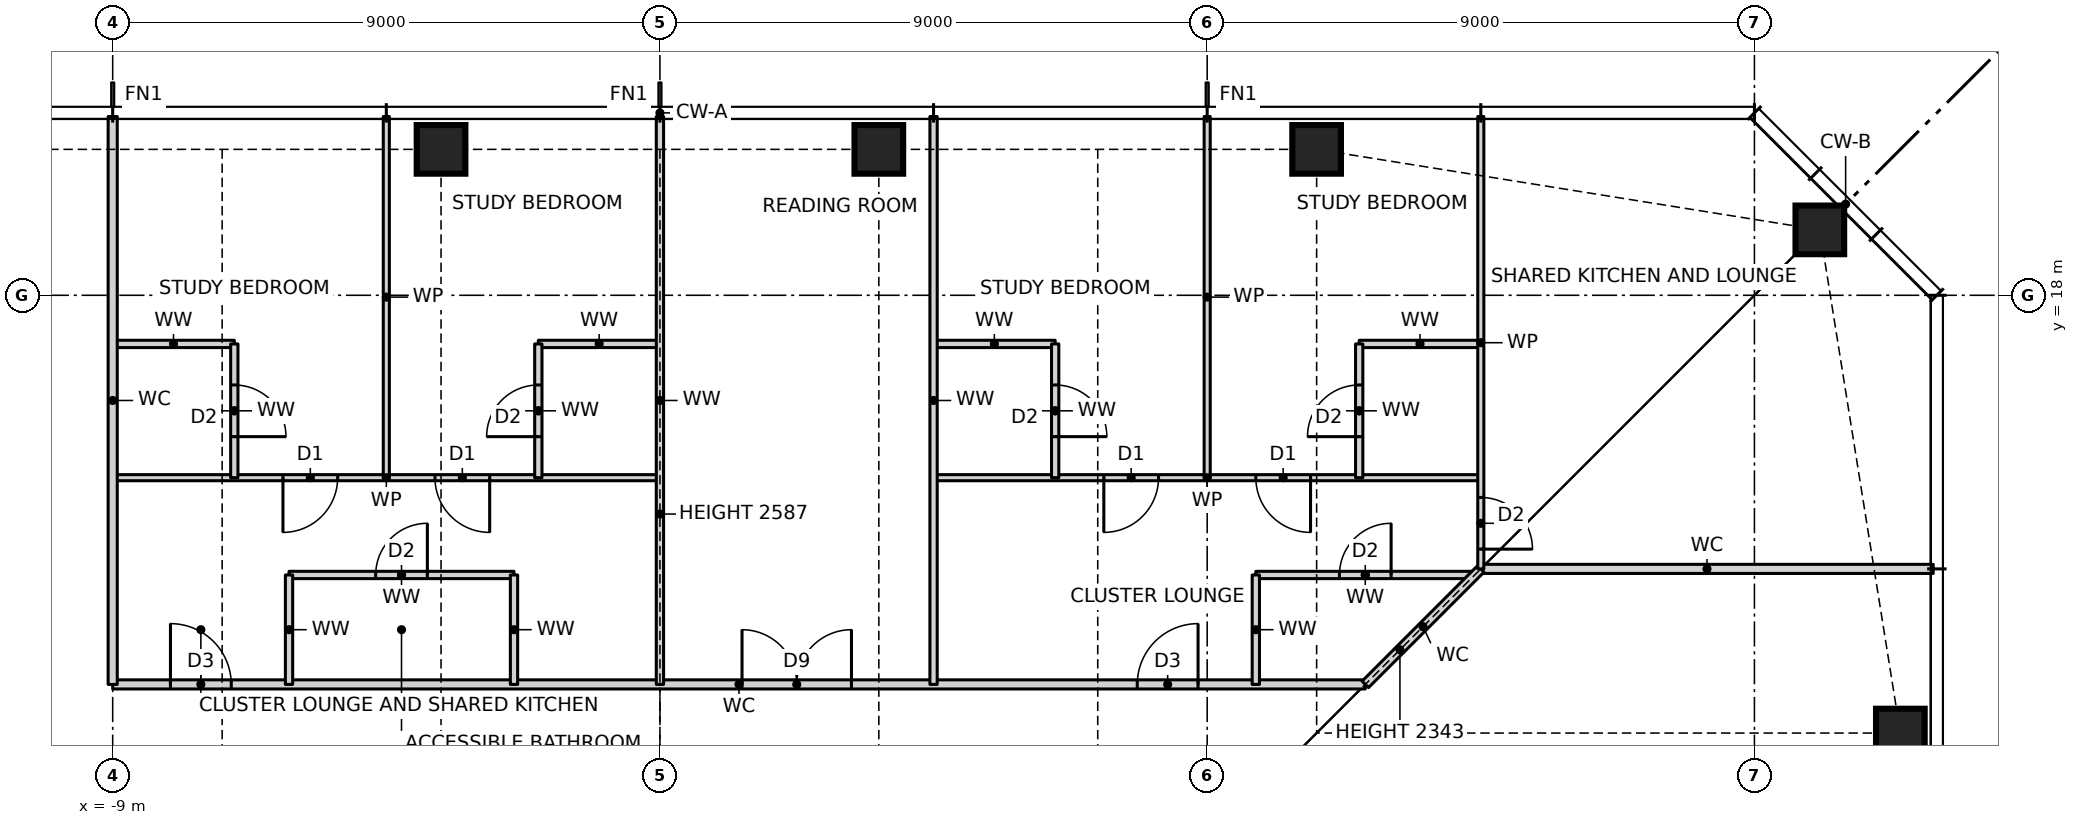
"""IFC4 building model, lengths in metres.
Left out: names, types, materials, properties, quantities, classifications, styles, units other than length and angle.
Written with IfcOpenShell. Run it as: python <this file> out.ifc"""

import sys

from ifc_helpers import new_model, si_unit, direction, frame, frame_2d, origin, origin_2d, place, context, subcontext, project, spatial, rectangle, hollow_rectangle, extrude, element, fill, save


model = new_model("IFC4")
c1 = context("Model", 3, precision=1e-05, world=origin(), true_north=direction((0.0, 1.0)))
c2 = subcontext(c1, "Body", "Model", "MODEL_VIEW")
j1 = project(units=[si_unit("LENGTHUNIT", "METRE"), si_unit("PLANEANGLEUNIT", "RADIAN")], contexts=[c1])
p1 = place(None, origin())
s1 = spatial("IfcSite", under=j1, at=p1, CompositionType="ELEMENT")
p2 = place(p1, origin())
s2 = spatial("IfcBuilding", under=s1, at=p2, CompositionType="ELEMENT")
p3 = place(p2, frame((0.0, 0.0, 108.5)))
s3 = spatial("IfcBuildingStorey", under=s2, at=p3, CompositionType="ELEMENT", Elevation=108.5)
for number, where, z_axis, x_axis in (
    (1, (20.4, 10.8, 0.0), (0.0, 0.0, 1.0), (1.0, 0.0, 0.0)),
    (2, (19.076, 19.076, 0.0), (0.0, 0.0, 1.0), (1.0, 0.0, 0.0)),
    (3, (10.8, 20.4, 0.0), (0.0, 0.0, 1.0), (1.0, 0.0, 0.0)),
    (4, (3.6, 20.4, 0.0), (0.0, 0.0, 1.0), (1.0, 0.0, 0.0)),
    (5, (-3.6, 20.4, 0.0), (0.0, 0.0, 1.0), (1.0, 0.0, 0.0)),
):
    element("IfcColumn", number, at=place(p3, frame(where, z_axis=z_axis, x_axis=x_axis)), inside=s3, PredefinedType="COLUMN", context=c2, shape_type="SweptSolid", body=[
        extrude(hollow_rectangle(XDim=0.8, YDim=0.8, WallThickness=0.07, at=origin_2d()), origin(), (0.0, 0.0, 1.0), 3.5),
    ])
p4 = place(p3, frame((-9.0, 11.6, 0.0), z_axis=(0.0, 0.0, 1.0), x_axis=(1.0, 0.0, 0.0)))
e6 = element("IfcWall", 6, at=p4, inside=s3, PredefinedType="PARTITIONING", context=c2, shape_type="SweptSolid", body=[
    extrude(rectangle(XDim=20.6, YDim=0.15, at=frame_2d((10.3, 0.0))), origin(), (0.0, 0.0, 1.0), 3.27),
])
p5 = place(p4, frame((16.85, 0.0, 0.0)))
e7 = element("IfcOpeningElement", 7, at=p5, cuts=e6, PredefinedType="OPENING", context=c2, shape_type="SweptSolid", body=[
    extrude(rectangle(XDim=1.0, YDim=2.1, at=frame_2d((0.5, 1.05))), frame((0.0, 0.085, 0.0), z_axis=(0.0, -1.0, 0.0), x_axis=(1.0, 0.0, 0.0)), (0.0, 0.0, 1.0), 0.17),
])
p6 = place(p4, frame((10.35, 0.0, 0.0)))
e8 = element("IfcOpeningElement", 8, at=p6, cuts=e6, PredefinedType="OPENING", context=c2, shape_type="SweptSolid", body=[
    extrude(rectangle(XDim=1.8, YDim=2.1, at=frame_2d((0.9, 1.05))), frame((0.0, 0.085, 0.0), z_axis=(0.0, -1.0, 0.0), x_axis=(1.0, 0.0, 0.0)), (0.0, 0.0, 1.0), 0.17),
])
p7 = place(p4, frame((0.95, 0.0, 0.0)))
e9 = element("IfcOpeningElement", 9, at=p7, cuts=e6, PredefinedType="OPENING", context=c2, shape_type="SweptSolid", body=[
    extrude(rectangle(XDim=1.0, YDim=2.1, at=frame_2d((0.5, 1.05))), frame((0.0, 0.085, 0.0), z_axis=(0.0, -1.0, 0.0), x_axis=(1.0, 0.0, 0.0)), (0.0, 0.0, 1.0), 0.17),
])
p8 = place(p3, frame((-6.1, 13.4, 0.0), z_axis=(0.0, 0.0, 1.0), x_axis=(1.0, 0.0, 0.0)))
e10 = element("IfcWall", 10, at=p8, inside=s3, PredefinedType="PARTITIONING", context=c2, shape_type="SweptSolid", body=[
    extrude(rectangle(XDim=3.7, YDim=0.12, at=frame_2d((1.85, 0.0))), origin(), (0.0, 0.0, 1.0), 3.27),
])
p9 = place(p8, frame((1.425, 0.0, 0.0)))
e11 = element("IfcOpeningElement", 11, at=p9, cuts=e10, PredefinedType="OPENING", context=c2, shape_type="SweptSolid", body=[
    extrude(rectangle(XDim=0.85, YDim=2.1, at=frame_2d((0.425, 1.05))), frame((0.0, 0.07, 0.0), z_axis=(0.0, -1.0, 0.0), x_axis=(1.0, 0.0, 0.0)), (0.0, 0.0, 1.0), 0.14),
])
p10 = place(p3, frame((9.8, 13.4, 0.0), z_axis=(0.0, 0.0, 1.0), x_axis=(1.0, 0.0, 0.0)))
e12 = element("IfcWall", 12, at=p10, inside=s3, PredefinedType="PARTITIONING", context=c2, shape_type="SweptSolid", body=[
    extrude(rectangle(XDim=3.6, YDim=0.12, at=frame_2d((1.8, 0.0))), origin(), (0.0, 0.0, 1.0), 3.27),
])
p11 = place(p10, frame((1.375, 0.0, 0.0)))
e13 = element("IfcOpeningElement", 13, at=p11, cuts=e12, PredefinedType="OPENING", context=c2, shape_type="SweptSolid", body=[
    extrude(rectangle(XDim=0.85, YDim=2.1, at=frame_2d((0.425, 1.05))), frame((0.0, 0.07, 0.0), z_axis=(0.0, -1.0, 0.0), x_axis=(1.0, 0.0, 0.0)), (0.0, 0.0, 1.0), 0.14),
])
p12 = place(p3, frame((13.5, 13.5, 0.0), z_axis=(0.0, 0.0, 1.0), x_axis=(1.0, 0.0, 0.0)))
e14 = element("IfcWall", 14, at=p12, inside=s3, PredefinedType="PARTITIONING", context=c2, shape_type="SweptSolid", body=[
    extrude(rectangle(XDim=7.44, YDim=0.15, at=frame_2d((3.72, 0.0))), origin(), (0.0, 0.0, 1.0), 3.27),
])
p13 = place(p3, frame((-9.0, 15.0, 0.0), z_axis=(0.0, 0.0, 1.0), x_axis=(1.0, 0.0, 0.0)))
e15 = element("IfcWall", 15, at=p13, inside=s3, PredefinedType="PARTITIONING", context=c2, shape_type="SweptSolid", body=[
    extrude(rectangle(XDim=9.0, YDim=0.1, at=frame_2d((4.5, 0.0))), origin(), (0.0, 0.0, 1.0), 3.27),
])
p14 = place(p13, frame((5.3, 0.0, 0.0)))
e16 = element("IfcOpeningElement", 16, at=p14, cuts=e15, PredefinedType="OPENING", context=c2, shape_type="SweptSolid", body=[
    extrude(rectangle(XDim=0.9, YDim=2.1, at=frame_2d((0.45, 1.05))), frame((0.0, 0.06, 0.0), z_axis=(0.0, -1.0, 0.0), x_axis=(1.0, 0.0, 0.0)), (0.0, 0.0, 1.0), 0.12),
])
p15 = place(p13, frame((2.8, 0.0, 0.0)))
e17 = element("IfcOpeningElement", 17, at=p15, cuts=e15, PredefinedType="OPENING", context=c2, shape_type="SweptSolid", body=[
    extrude(rectangle(XDim=0.9, YDim=2.1, at=frame_2d((0.45, 1.05))), frame((0.0, 0.06, 0.0), z_axis=(0.0, -1.0, 0.0), x_axis=(1.0, 0.0, 0.0)), (0.0, 0.0, 1.0), 0.12),
])
p16 = place(p3, frame((4.5, 15.0, 0.0), z_axis=(0.0, 0.0, 1.0), x_axis=(1.0, 0.0, 0.0)))
e18 = element("IfcWall", 18, at=p16, inside=s3, PredefinedType="PARTITIONING", context=c2, shape_type="SweptSolid", body=[
    extrude(rectangle(XDim=9.0, YDim=0.1, at=frame_2d((4.5, 0.0))), origin(), (0.0, 0.0, 1.0), 3.27),
])
p17 = place(p16, frame((5.3, 0.0, 0.0)))
e19 = element("IfcOpeningElement", 19, at=p17, cuts=e18, PredefinedType="OPENING", context=c2, shape_type="SweptSolid", body=[
    extrude(rectangle(XDim=0.9, YDim=2.1, at=frame_2d((0.45, 1.05))), frame((0.0, 0.06, 0.0), z_axis=(0.0, -1.0, 0.0), x_axis=(1.0, 0.0, 0.0)), (0.0, 0.0, 1.0), 0.12),
])
p18 = place(p16, frame((2.8, 0.0, 0.0)))
e20 = element("IfcOpeningElement", 20, at=p18, cuts=e18, PredefinedType="OPENING", context=c2, shape_type="SweptSolid", body=[
    extrude(rectangle(XDim=0.9, YDim=2.1, at=frame_2d((0.45, 1.05))), frame((0.0, 0.06, 0.0), z_axis=(0.0, -1.0, 0.0), x_axis=(1.0, 0.0, 0.0)), (0.0, 0.0, 1.0), 0.12),
])
for number, where, z_axis, x_axis in (
    (21, (-9.0, 17.2, 0.0), (0.0, 0.0, 1.0), (1.0, 0.0, 0.0)),
    (22, (-2.0, 17.2, 0.0), (0.0, 0.0, 1.0), (1.0, 0.0, 0.0)),
    (23, (4.5, 17.2, 0.0), (0.0, 0.0, 1.0), (1.0, 0.0, 0.0)),
    (24, (11.5, 17.2, 0.0), (0.0, 0.0, 1.0), (1.0, 0.0, 0.0)),
):
    element("IfcWall", number, at=place(p3, frame(where, z_axis=z_axis, x_axis=x_axis)), inside=s3, PredefinedType="PARTITIONING", context=c2, shape_type="SweptSolid", body=[
        extrude(rectangle(XDim=2.0, YDim=0.12, at=frame_2d((1.0, 0.0))), origin(), (0.0, 0.0, 1.0), 3.27),
    ])
p19 = place(p3, frame((11.6, 11.6, 0.0), z_axis=(0.0, 0.0, 1.0), x_axis=(0.707106781187, 0.707106781187, 0.0)))
e25 = element("IfcWall", 25, at=p19, inside=s3, PredefinedType="PARTITIONING", context=c2, shape_type="SweptSolid", body=[
    extrude(rectangle(XDim=2.687, YDim=0.15, at=frame_2d((1.343, 0.0))), origin(), (0.0, 0.0, 1.0), 2.343),
])
p20 = place(p3, frame((13.5, 13.5, 0.0), z_axis=(0.0, 0.0, 1.0), x_axis=(0.0, 1.0, 0.0)))
e26 = element("IfcWall", 26, at=p20, inside=s3, PredefinedType="PARTITIONING", context=c2, shape_type="SweptSolid", body=[
    extrude(rectangle(XDim=7.44, YDim=0.1, at=frame_2d((3.72, 0.0))), origin(), (0.0, 0.0, 1.0), 3.27),
])
p21 = place(p20, frame((0.325, 0.0, 0.0)))
e27 = element("IfcOpeningElement", 27, at=p21, cuts=e26, PredefinedType="OPENING", context=c2, shape_type="SweptSolid", body=[
    extrude(rectangle(XDim=0.85, YDim=2.1, at=frame_2d((0.425, 1.05))), frame((0.0, 0.06, 0.0), z_axis=(0.0, -1.0, 0.0), x_axis=(1.0, 0.0, 0.0)), (0.0, 0.0, 1.0), 0.12),
])
p22 = place(p3, frame((11.5, 15.0, 0.0), z_axis=(0.0, 0.0, 1.0), x_axis=(0.0, 1.0, 0.0)))
e28 = element("IfcWall", 28, at=p22, inside=s3, PredefinedType="PARTITIONING", context=c2, shape_type="SweptSolid", body=[
    extrude(rectangle(XDim=2.2, YDim=0.12, at=frame_2d((1.1, 0.0))), origin(), (0.0, 0.0, 1.0), 3.27),
])
p23 = place(p22, frame((0.675, 0.0, 0.0)))
e29 = element("IfcOpeningElement", 29, at=p23, cuts=e28, PredefinedType="OPENING", context=c2, shape_type="SweptSolid", body=[
    extrude(rectangle(XDim=0.85, YDim=2.1, at=frame_2d((0.425, 1.05))), frame((0.0, 0.07, 0.0), z_axis=(0.0, -1.0, 0.0), x_axis=(1.0, 0.0, 0.0)), (0.0, 0.0, 1.0), 0.14),
])
p24 = place(p3, frame((9.8, 11.6, 0.0), z_axis=(0.0, 0.0, 1.0), x_axis=(0.0, 1.0, 0.0)))
e30 = element("IfcWall", 30, at=p24, inside=s3, PredefinedType="PARTITIONING", context=c2, shape_type="SweptSolid", body=[
    extrude(rectangle(XDim=1.8, YDim=0.12, at=frame_2d((0.9, 0.0))), origin(), (0.0, 0.0, 1.0), 3.27),
])
p25 = place(p3, frame((9.0, 15.0, 0.0), z_axis=(0.0, 0.0, 1.0), x_axis=(0.0, 1.0, 0.0)))
e31 = element("IfcWall", 31, at=p25, inside=s3, PredefinedType="PARTITIONING", context=c2, shape_type="SweptSolid", body=[
    extrude(rectangle(XDim=5.94, YDim=0.1, at=frame_2d((2.97, 0.0))), origin(), (0.0, 0.0, 1.0), 3.27),
])
p26 = place(p3, frame((6.5, 15.0, 0.0), z_axis=(0.0, 0.0, 1.0), x_axis=(0.0, 1.0, 0.0)))
e32 = element("IfcWall", 32, at=p26, inside=s3, PredefinedType="PARTITIONING", context=c2, shape_type="SweptSolid", body=[
    extrude(rectangle(XDim=2.2, YDim=0.12, at=frame_2d((1.1, 0.0))), origin(), (0.0, 0.0, 1.0), 3.27),
])
p27 = place(p26, frame((0.675, 0.0, 0.0)))
e33 = element("IfcOpeningElement", 33, at=p27, cuts=e32, PredefinedType="OPENING", context=c2, shape_type="SweptSolid", body=[
    extrude(rectangle(XDim=0.85, YDim=2.1, at=frame_2d((0.425, 1.05))), frame((0.0, 0.07, 0.0), z_axis=(0.0, -1.0, 0.0), x_axis=(1.0, 0.0, 0.0)), (0.0, 0.0, 1.0), 0.14),
])
p28 = place(p3, frame((4.5, 11.6, 0.0), z_axis=(0.0, 0.0, 1.0), x_axis=(0.0, 1.0, 0.0)))
e34 = element("IfcWall", 34, at=p28, inside=s3, PredefinedType="PARTITIONING", context=c2, shape_type="SweptSolid", body=[
    extrude(rectangle(XDim=9.34, YDim=0.12, at=frame_2d((4.67, 0.0))), origin(), (0.0, 0.0, 1.0), 3.27),
])
p29 = place(p3, frame((0.0, 11.6, 0.0), z_axis=(0.0, 0.0, 1.0), x_axis=(0.0, 1.0, 0.0)))
e35 = element("IfcWall", 35, at=p29, inside=s3, PredefinedType="PARTITIONING", context=c2, shape_type="SweptSolid", body=[
    extrude(rectangle(XDim=9.34, YDim=0.12, at=frame_2d((4.67, 0.0))), origin(), (0.0, 0.0, 1.0), 2.587),
])
p30 = place(p3, frame((-2.0, 15.0, 0.0), z_axis=(0.0, 0.0, 1.0), x_axis=(0.0, 1.0, 0.0)))
e36 = element("IfcWall", 36, at=p30, inside=s3, PredefinedType="PARTITIONING", context=c2, shape_type="SweptSolid", body=[
    extrude(rectangle(XDim=2.2, YDim=0.12, at=frame_2d((1.1, 0.0))), origin(), (0.0, 0.0, 1.0), 3.27),
])
p31 = place(p30, frame((0.675, 0.0, 0.0)))
e37 = element("IfcOpeningElement", 37, at=p31, cuts=e36, PredefinedType="OPENING", context=c2, shape_type="SweptSolid", body=[
    extrude(rectangle(XDim=0.85, YDim=2.1, at=frame_2d((0.425, 1.05))), frame((0.0, 0.07, 0.0), z_axis=(0.0, -1.0, 0.0), x_axis=(1.0, 0.0, 0.0)), (0.0, 0.0, 1.0), 0.14),
])
p32 = place(p3, frame((-2.4, 11.6, 0.0), z_axis=(0.0, 0.0, 1.0), x_axis=(0.0, 1.0, 0.0)))
e38 = element("IfcWall", 38, at=p32, inside=s3, PredefinedType="PARTITIONING", context=c2, shape_type="SweptSolid", body=[
    extrude(rectangle(XDim=1.8, YDim=0.12, at=frame_2d((0.9, 0.0))), origin(), (0.0, 0.0, 1.0), 3.27),
])
p33 = place(p3, frame((-4.5, 15.0, 0.0), z_axis=(0.0, 0.0, 1.0), x_axis=(0.0, 1.0, 0.0)))
e39 = element("IfcWall", 39, at=p33, inside=s3, PredefinedType="PARTITIONING", context=c2, shape_type="SweptSolid", body=[
    extrude(rectangle(XDim=5.94, YDim=0.1, at=frame_2d((2.97, 0.0))), origin(), (0.0, 0.0, 1.0), 3.27),
])
p34 = place(p3, frame((-6.1, 11.6, 0.0), z_axis=(0.0, 0.0, 1.0), x_axis=(0.0, 1.0, 0.0)))
e40 = element("IfcWall", 40, at=p34, inside=s3, PredefinedType="PARTITIONING", context=c2, shape_type="SweptSolid", body=[
    extrude(rectangle(XDim=1.8, YDim=0.12, at=frame_2d((0.9, 0.0))), origin(), (0.0, 0.0, 1.0), 3.27),
])
p35 = place(p3, frame((-7.0, 15.0, 0.0), z_axis=(0.0, 0.0, 1.0), x_axis=(0.0, 1.0, 0.0)))
e41 = element("IfcWall", 41, at=p35, inside=s3, PredefinedType="PARTITIONING", context=c2, shape_type="SweptSolid", body=[
    extrude(rectangle(XDim=2.2, YDim=0.12, at=frame_2d((1.1, 0.0))), origin(), (0.0, 0.0, 1.0), 3.27),
])
p36 = place(p35, frame((0.675, 0.0, 0.0)))
e42 = element("IfcOpeningElement", 42, at=p36, cuts=e41, PredefinedType="OPENING", context=c2, shape_type="SweptSolid", body=[
    extrude(rectangle(XDim=0.85, YDim=2.1, at=frame_2d((0.425, 1.05))), frame((0.0, 0.07, 0.0), z_axis=(0.0, -1.0, 0.0), x_axis=(1.0, 0.0, 0.0)), (0.0, 0.0, 1.0), 0.14),
])
p37 = place(p3, frame((-9.0, 11.6, 0.0), z_axis=(0.0, 0.0, 1.0), x_axis=(0.0, 1.0, 0.0)))
e43 = element("IfcWall", 43, at=p37, inside=s3, PredefinedType="PARTITIONING", context=c2, shape_type="SweptSolid", body=[
    extrude(rectangle(XDim=9.34, YDim=0.15, at=frame_2d((4.67, 0.0))), origin(), (0.0, 0.0, 1.0), 3.27),
])
p38 = place(p23, origin())
e44 = element("IfcDoor", 44, at=p38, inside=s3, OperationType="SINGLE_SWING_LEFT", PredefinedType="DOOR", context=c2, shape_type="SweptSolid", body=[
    extrude(rectangle(XDim=0.85, YDim=2.1, at=frame_2d((0.425, 1.05))), frame((0.0, 0.025, 0.0), z_axis=(0.0, -1.0, 0.0), x_axis=(1.0, 0.0, 0.0)), (0.0, 0.0, 1.0), 0.05),
])
fill(e29, e44)
p39 = place(p17, frame((0.9, 0.0, 0.0), z_axis=(0.0, 0.0, 1.0), x_axis=(-1.0, 0.0, 0.0)))
e45 = element("IfcDoor", 45, at=p39, inside=s3, OperationType="SINGLE_SWING_LEFT", PredefinedType="DOOR", context=c2, shape_type="SweptSolid", body=[
    extrude(rectangle(XDim=0.9, YDim=2.1, at=frame_2d((0.45, 1.05))), frame((0.0, 0.025, 0.0), z_axis=(0.0, -1.0, 0.0), x_axis=(1.0, 0.0, 0.0)), (0.0, 0.0, 1.0), 0.05),
])
fill(e19, e45)
p40 = place(p27, frame((0.85, 0.0, 0.0), z_axis=(0.0, 0.0, 1.0), x_axis=(-1.0, 0.0, 0.0)))
e46 = element("IfcDoor", 46, at=p40, inside=s3, OperationType="SINGLE_SWING_RIGHT", PredefinedType="DOOR", context=c2, shape_type="SweptSolid", body=[
    extrude(rectangle(XDim=0.85, YDim=2.1, at=frame_2d((0.425, 1.05))), frame((0.0, 0.025, 0.0), z_axis=(0.0, -1.0, 0.0), x_axis=(1.0, 0.0, 0.0)), (0.0, 0.0, 1.0), 0.05),
])
fill(e33, e46)
p41 = place(p18, frame((0.9, 0.0, 0.0), z_axis=(0.0, 0.0, 1.0), x_axis=(-1.0, 0.0, 0.0)))
e47 = element("IfcDoor", 47, at=p41, inside=s3, OperationType="SINGLE_SWING_RIGHT", PredefinedType="DOOR", context=c2, shape_type="SweptSolid", body=[
    extrude(rectangle(XDim=0.9, YDim=2.1, at=frame_2d((0.45, 1.05))), frame((0.0, 0.025, 0.0), z_axis=(0.0, -1.0, 0.0), x_axis=(1.0, 0.0, 0.0)), (0.0, 0.0, 1.0), 0.05),
])
fill(e20, e47)
p42 = place(p5, origin())
e48 = element("IfcDoor", 48, at=p42, inside=s3, OperationType="SINGLE_SWING_RIGHT", PredefinedType="DOOR", context=c2, shape_type="SweptSolid", body=[
    extrude(rectangle(XDim=1.0, YDim=2.1, at=frame_2d((0.5, 1.05))), frame((0.0, 0.025, 0.0), z_axis=(0.0, -1.0, 0.0), x_axis=(1.0, 0.0, 0.0)), (0.0, 0.0, 1.0), 0.05),
])
fill(e7, e48)
p43 = place(p11, origin())
e49 = element("IfcDoor", 49, at=p43, inside=s3, OperationType="SINGLE_SWING_RIGHT", PredefinedType="DOOR", context=c2, shape_type="SweptSolid", body=[
    extrude(rectangle(XDim=0.85, YDim=2.1, at=frame_2d((0.425, 1.05))), frame((0.0, 0.025, 0.0), z_axis=(0.0, -1.0, 0.0), x_axis=(1.0, 0.0, 0.0)), (0.0, 0.0, 1.0), 0.05),
])
fill(e13, e49)
p44 = place(p6, origin())
e50 = element("IfcDoor", 50, at=p44, inside=s3, OperationType="DOUBLE_DOOR_SINGLE_SWING", PredefinedType="DOOR", context=c2, shape_type="SweptSolid", body=[
    extrude(rectangle(XDim=1.8, YDim=2.1, at=frame_2d((0.9, 1.05))), frame((0.0, 0.025, 0.0), z_axis=(0.0, -1.0, 0.0), x_axis=(1.0, 0.0, 0.0)), (0.0, 0.0, 1.0), 0.05),
])
fill(e8, e50)
p45 = place(p31, origin())
e51 = element("IfcDoor", 51, at=p45, inside=s3, OperationType="SINGLE_SWING_LEFT", PredefinedType="DOOR", context=c2, shape_type="SweptSolid", body=[
    extrude(rectangle(XDim=0.85, YDim=2.1, at=frame_2d((0.425, 1.05))), frame((0.0, 0.025, 0.0), z_axis=(0.0, -1.0, 0.0), x_axis=(1.0, 0.0, 0.0)), (0.0, 0.0, 1.0), 0.05),
])
fill(e37, e51)
p46 = place(p14, frame((0.9, 0.0, 0.0), z_axis=(0.0, 0.0, 1.0), x_axis=(-1.0, 0.0, 0.0)))
e52 = element("IfcDoor", 52, at=p46, inside=s3, OperationType="SINGLE_SWING_LEFT", PredefinedType="DOOR", context=c2, shape_type="SweptSolid", body=[
    extrude(rectangle(XDim=0.9, YDim=2.1, at=frame_2d((0.45, 1.05))), frame((0.0, 0.025, 0.0), z_axis=(0.0, -1.0, 0.0), x_axis=(1.0, 0.0, 0.0)), (0.0, 0.0, 1.0), 0.05),
])
fill(e16, e52)
p47 = place(p36, frame((0.85, 0.0, 0.0), z_axis=(0.0, 0.0, 1.0), x_axis=(-1.0, 0.0, 0.0)))
e53 = element("IfcDoor", 53, at=p47, inside=s3, OperationType="SINGLE_SWING_RIGHT", PredefinedType="DOOR", context=c2, shape_type="SweptSolid", body=[
    extrude(rectangle(XDim=0.85, YDim=2.1, at=frame_2d((0.425, 1.05))), frame((0.0, 0.025, 0.0), z_axis=(0.0, -1.0, 0.0), x_axis=(1.0, 0.0, 0.0)), (0.0, 0.0, 1.0), 0.05),
])
fill(e42, e53)
p48 = place(p15, frame((0.9, 0.0, 0.0), z_axis=(0.0, 0.0, 1.0), x_axis=(-1.0, 0.0, 0.0)))
e54 = element("IfcDoor", 54, at=p48, inside=s3, OperationType="SINGLE_SWING_RIGHT", PredefinedType="DOOR", context=c2, shape_type="SweptSolid", body=[
    extrude(rectangle(XDim=0.9, YDim=2.1, at=frame_2d((0.45, 1.05))), frame((0.0, 0.025, 0.0), z_axis=(0.0, -1.0, 0.0), x_axis=(1.0, 0.0, 0.0)), (0.0, 0.0, 1.0), 0.05),
])
fill(e17, e54)
p49 = place(p7, origin())
e55 = element("IfcDoor", 55, at=p49, inside=s3, OperationType="SINGLE_SWING_LEFT", PredefinedType="DOOR", context=c2, shape_type="SweptSolid", body=[
    extrude(rectangle(XDim=1.0, YDim=2.1, at=frame_2d((0.5, 1.05))), frame((0.0, 0.025, 0.0), z_axis=(0.0, -1.0, 0.0), x_axis=(1.0, 0.0, 0.0)), (0.0, 0.0, 1.0), 0.05),
])
fill(e9, e55)
p50 = place(p9, origin())
e56 = element("IfcDoor", 56, at=p50, inside=s3, OperationType="SINGLE_SWING_RIGHT", PredefinedType="DOOR", context=c2, shape_type="SweptSolid", body=[
    extrude(rectangle(XDim=0.85, YDim=2.1, at=frame_2d((0.425, 1.05))), frame((0.0, 0.025, 0.0), z_axis=(0.0, -1.0, 0.0), x_axis=(1.0, 0.0, 0.0)), (0.0, 0.0, 1.0), 0.05),
])
fill(e11, e56)
p51 = place(p21, frame((0.85, 0.0, 0.0), z_axis=(0.0, 0.0, 1.0), x_axis=(-1.0, 0.0, 0.0)))
e57 = element("IfcDoor", 57, at=p51, inside=s3, OperationType="SINGLE_SWING_RIGHT", PredefinedType="DOOR", context=c2, shape_type="SweptSolid", body=[
    extrude(rectangle(XDim=0.85, YDim=2.1, at=frame_2d((0.425, 1.05))), frame((0.0, 0.025, 0.0), z_axis=(0.0, -1.0, 0.0), x_axis=(1.0, 0.0, 0.0)), (0.0, 0.0, 1.0), 0.05),
])
fill(e27, e57)
save(model, sys.argv[1])
